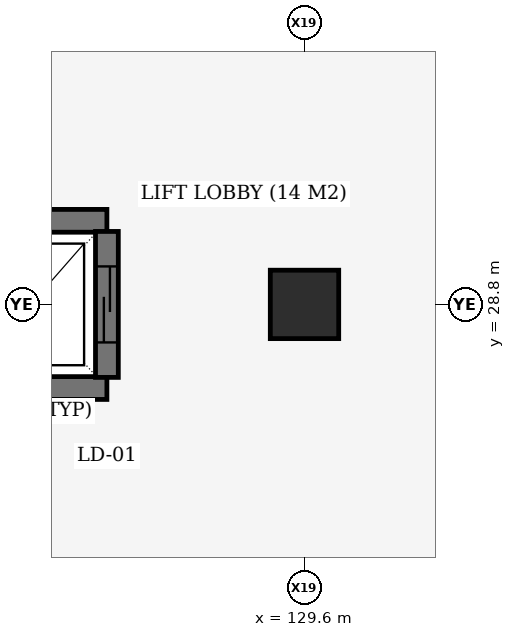
"""IFC4 building model, lengths in metres.
Left out: names, types, materials, properties, quantities, classifications, styles, units other than length and angle.
Written with IfcOpenShell. Run it as: python <this file> out.ifc"""

import sys

from ifc_helpers import new_model, si_unit, direction, frame, frame_2d, origin, origin_2d, place, context, subcontext, project, spatial, rectangle, extrude, element, fill, save


model = new_model("IFC4")
c1 = context("Model", 3, precision=1e-05, world=origin(), true_north=direction((0.0, 1.0)))
c2 = subcontext(c1, "Body", "Model", "MODEL_VIEW")
j1 = project(units=[si_unit("LENGTHUNIT", "METRE"), si_unit("PLANEANGLEUNIT", "RADIAN")], contexts=[c1])
p1 = place(None, origin())
s1 = spatial("IfcSite", under=j1, at=p1, CompositionType="ELEMENT")
p2 = place(p1, origin())
s2 = spatial("IfcBuilding", under=s1, at=p2, CompositionType="ELEMENT")
p3 = place(p2, frame((0.0, 0.0, -4.5)))
s3 = spatial("IfcBuildingStorey", under=s2, at=p3, CompositionType="ELEMENT", Elevation=-4.5)
p4 = place(p3, frame((129.6, 28.8, -0.42), z_axis=(0.0, 0.0, 1.0), x_axis=(1.0, 0.0, 0.0)))
e1 = element("IfcColumn", 1, at=p4, inside=s3, PredefinedType="COLUMN", context=c2, shape_type="SweptSolid", body=[
    extrude(rectangle(XDim=0.9, YDim=0.9, at=origin_2d()), origin(), (0.0, 0.0, 1.0), 4.6),
])
for number, where, z_axis, x_axis in (
    (2, (125.0, 27.7, 0.0), (0.0, 0.0, 1.0), (1.0, 0.0, 0.0)),
    (3, (127.0, 29.9, 0.0), (0.0, 0.0, 1.0), (-1.0, 0.0, 0.0)),
):
    element("IfcWall", number, at=place(p3, frame(where, z_axis=z_axis, x_axis=x_axis)), inside=s3, PredefinedType="SHEAR", context=c2, shape_type="SweptSolid", body=[
        extrude(rectangle(XDim=2.0, YDim=0.3, at=frame_2d((1.0, 0.0))), origin(), (0.0, 0.0, 1.0), 4.18),
    ])
p5 = place(p3, frame((127.0, 29.76, 0.0), z_axis=(0.0, 0.0, 1.0), x_axis=(0.0, -1.0, 0.0)))
e4 = element("IfcWall", 4, at=p5, inside=s3, PredefinedType="SHEAR", context=c2, shape_type="SweptSolid", body=[
    extrude(rectangle(XDim=1.92, YDim=0.3, at=frame_2d((0.96, 0.0))), origin(), (0.0, 0.0, 1.0), 4.18),
])
p6 = place(p5, frame((0.46, 0.0, 0.0)))
e5 = element("IfcOpeningElement", 5, at=p6, cuts=e4, PredefinedType="OPENING", context=c2, shape_type="SweptSolid", body=[
    extrude(rectangle(XDim=1.0, YDim=2.1, at=frame_2d((0.5, 1.05))), frame((0.0, 0.16, 0.0), z_axis=(0.0, -1.0, 0.0), x_axis=(1.0, 0.0, 0.0)), (0.0, 0.0, 1.0), 0.32),
])
p7 = place(p6, origin())
e6 = element("IfcDoor", 6, at=p7, inside=s3, OperationType="SLIDING_TO_LEFT", PredefinedType="DOOR", context=c2, shape_type="SweptSolid", body=[
    extrude(rectangle(XDim=1.0, YDim=2.1, at=frame_2d((0.5, 1.05))), frame((0.0, 0.025, 0.0), z_axis=(0.0, -1.0, 0.0), x_axis=(1.0, 0.0, 0.0)), (0.0, 0.0, 1.0), 0.05),
])
fill(e5, e6)
save(model, sys.argv[1])
